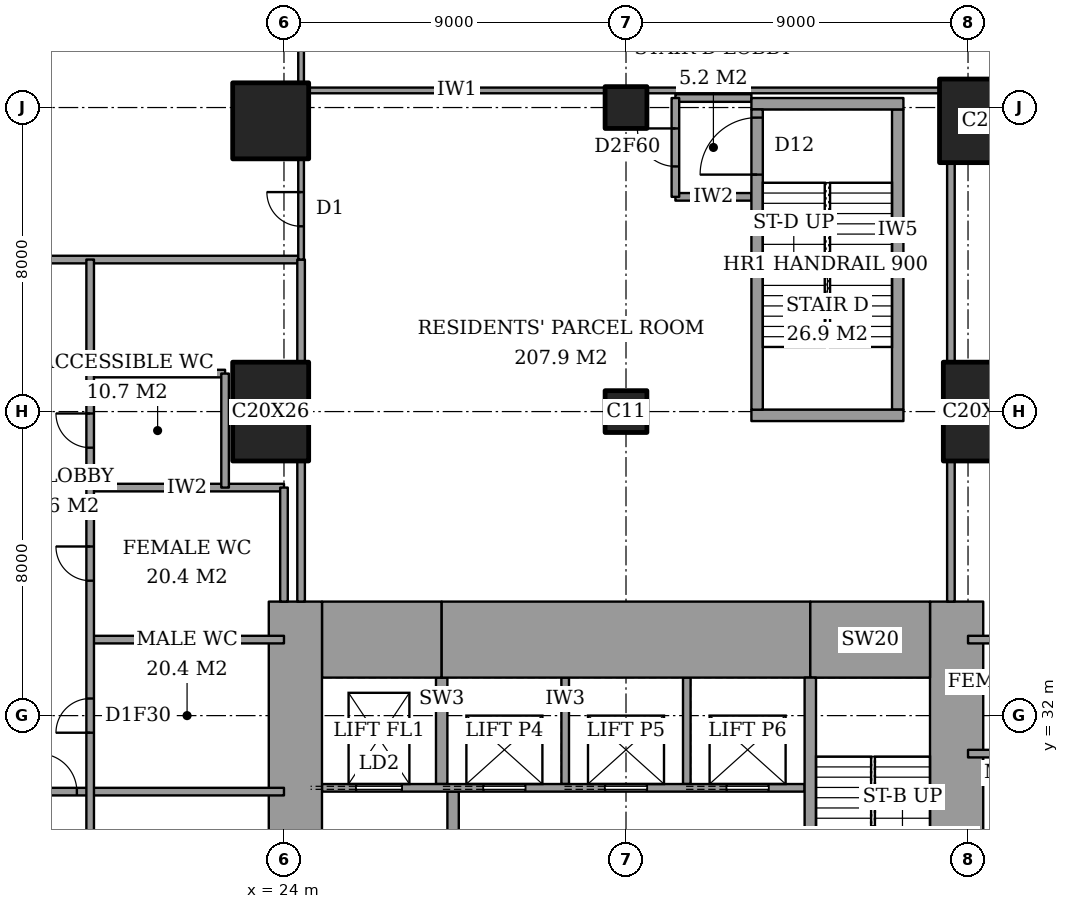
"""IFC4 building model, lengths in metres.
Left out: names, types, materials, properties, quantities, classifications, styles, units other than length and angle.
Written with IfcOpenShell. Run it as: python <this file> out.ifc"""

import sys

from ifc_helpers import new_model, si_unit, direction, frame, frame_2d, origin, origin_2d, place, context, subcontext, project, spatial, rectangle, extrude, element, fill, save


model = new_model("IFC4")
c1 = context("Model", 3, precision=1e-05, world=origin(), true_north=direction((0.0, 1.0)))
c2 = subcontext(c1, "Body", "Model", "MODEL_VIEW")
j1 = project(units=[si_unit("LENGTHUNIT", "METRE"), si_unit("PLANEANGLEUNIT", "RADIAN")], contexts=[c1])
p1 = place(None, origin())
s1 = spatial("IfcSite", under=j1, at=p1, CompositionType="ELEMENT")
p2 = place(p1, origin())
s2 = spatial("IfcBuilding", under=s1, at=p2, CompositionType="ELEMENT")
p3 = place(p2, origin())
s3 = spatial("IfcBuildingStorey", under=s2, at=p3, CompositionType="ELEMENT", Elevation=0.0)
p4 = place(p3, frame((23.65, 40.0, 0.0), z_axis=(0.0, 0.0, 1.0), x_axis=(1.0, 0.0, 0.0)))
e1 = element("IfcColumn", 1, at=p4, inside=s3, PredefinedType="COLUMN", context=c2, shape_type="SweptSolid", body=[
    extrude(rectangle(XDim=2.0, YDim=2.6, at=origin_2d()), origin(), (0.0, 0.0, 1.0), 6.0),
])
p5 = place(p3, frame((23.65, 47.65, 0.0), z_axis=(0.0, 0.0, 1.0), x_axis=(1.0, 0.0, 0.0)))
e2 = element("IfcColumn", 2, at=p5, inside=s3, PredefinedType="COLUMN", context=c2, shape_type="SweptSolid", body=[
    extrude(rectangle(XDim=2.0, YDim=2.0, at=origin_2d()), origin(), (0.0, 0.0, 1.0), 6.0),
])
for number, where, z_axis, x_axis in (
    (3, (33.0, 40.0, 0.0), (0.0, 0.0, 1.0), (1.0, 0.0, 0.0)),
    (4, (33.0, 48.0, 0.0), (0.0, 0.0, 1.0), (1.0, 0.0, 0.0)),
):
    element("IfcColumn", number, at=place(p3, frame(where, z_axis=z_axis, x_axis=x_axis)), inside=s3, PredefinedType="COLUMN", context=c2, shape_type="SweptSolid", body=[
        extrude(rectangle(XDim=1.1, YDim=1.1, at=origin_2d()), origin(), (0.0, 0.0, 1.0), 6.0),
    ])
p6 = place(p3, frame((42.35, 40.0, 0.0), z_axis=(0.0, 0.0, 1.0), x_axis=(1.0, 0.0, 0.0)))
e5 = element("IfcColumn", 5, at=p6, inside=s3, PredefinedType="COLUMN", context=c2, shape_type="SweptSolid", body=[
    extrude(rectangle(XDim=2.0, YDim=2.6, at=origin_2d()), origin(), (0.0, 0.0, 1.0), 6.0),
])
p7 = place(p3, frame((42.35, 47.65, 0.0), z_axis=(0.0, 0.0, 1.0), x_axis=(1.0, 0.0, 0.0)))
e6 = element("IfcColumn", 6, at=p7, inside=s3, PredefinedType="COLUMN", context=c2, shape_type="SweptSolid", body=[
    extrude(rectangle(XDim=2.2, YDim=2.2, at=origin_2d()), origin(), (0.0, 0.0, 1.0), 6.0),
])
p8 = place(p3, frame((25.0, 34.0, 0.0), z_axis=(0.0, 0.0, 1.0), x_axis=(1.0, 0.0, 0.0)))
e7 = element("IfcWall", 7, at=p8, inside=s3, PredefinedType="SHEAR", context=c2, shape_type="SweptSolid", body=[
    extrude(rectangle(XDim=3.15, YDim=2.0, at=frame_2d((1.575, 0.0))), origin(), (0.0, 0.0, 1.0), 6.0),
])
p9 = place(p3, frame((28.15, 34.0, 0.0), z_axis=(0.0, 0.0, 1.0), x_axis=(1.0, 0.0, 0.0)))
e8 = element("IfcWall", 8, at=p9, inside=s3, PredefinedType="SHEAR", context=c2, shape_type="SweptSolid", body=[
    extrude(rectangle(XDim=9.7, YDim=2.0, at=frame_2d((4.85, 0.0))), origin(), (0.0, 0.0, 1.0), 6.0),
])
p10 = place(p3, frame((37.85, 34.0, 0.0), z_axis=(0.0, 0.0, 1.0), x_axis=(1.0, 0.0, 0.0)))
e9 = element("IfcWall", 9, at=p10, inside=s3, PredefinedType="SHEAR", context=c2, shape_type="SweptSolid", body=[
    extrude(rectangle(XDim=3.15, YDim=2.0, at=frame_2d((1.575, 0.0))), origin(), (0.0, 0.0, 1.0), 6.0),
])
p11 = place(p3, frame((24.3, 23.15, 0.0), z_axis=(0.0, 0.0, 1.0), x_axis=(0.0, 1.0, 0.0)))
e10 = element("IfcWall", 10, at=p11, inside=s3, PredefinedType="SHEAR", context=c2, shape_type="SweptSolid", body=[
    extrude(rectangle(XDim=11.85, YDim=1.4, at=frame_2d((5.925, 0.0))), origin(), (0.0, 0.0, 1.0), 6.0),
])
p12 = place(p11, frame((0.75, 0.0, 0.0)))
e11 = element("IfcOpeningElement", 11, at=p12, cuts=e10, PredefinedType="OPENING", context=c2, shape_type="SweptSolid", body=[
    extrude(rectangle(XDim=1.8, YDim=2.4, at=frame_2d((0.9, 1.2))), frame((0.0, 0.71, 0.0), z_axis=(0.0, -1.0, 0.0), x_axis=(1.0, 0.0, 0.0)), (0.0, 0.0, 1.0), 1.42),
])
p13 = place(p3, frame((41.7, 24.85, 0.0), z_axis=(0.0, 0.0, 1.0), x_axis=(0.0, 1.0, 0.0)))
e12 = element("IfcWall", 12, at=p13, inside=s3, PredefinedType="SHEAR", context=c2, shape_type="SweptSolid", body=[
    extrude(rectangle(XDim=10.15, YDim=1.4, at=frame_2d((5.075, 0.0))), origin(), (0.0, 0.0, 1.0), 6.0),
])
p14 = place(p3, frame((37.85, 24.85, 0.0), z_axis=(0.0, 0.0, 1.0), x_axis=(0.0, 1.0, 0.0)))
e13 = element("IfcWall", 13, at=p14, inside=s3, PredefinedType="SHEAR", context=c2, shape_type="SweptSolid", body=[
    extrude(rectangle(XDim=8.15, YDim=0.3, at=frame_2d((4.075, 0.0))), origin(), (0.0, 0.0, 1.0), 6.0),
])
p15 = place(p3, frame((28.45, 23.3, 0.0), z_axis=(0.0, 0.0, 1.0), x_axis=(0.0, 1.0, 0.0)))
e14 = element("IfcWall", 14, at=p15, inside=s3, PredefinedType="PARTITIONING", context=c2, shape_type="SweptSolid", body=[
    extrude(rectangle(XDim=6.7, YDim=0.3, at=frame_2d((3.35, 0.0))), origin(), (0.0, 0.0, 1.0), 6.0),
])
p16 = place(p15, frame((2.7, 0.0, 0.0)))
e15 = element("IfcOpeningElement", 15, at=p16, cuts=e14, PredefinedType="OPENING", context=c2, shape_type="SweptSolid", body=[
    extrude(rectangle(XDim=1.2, YDim=2.1, at=frame_2d((0.6, 1.05))), frame((0.0, 0.16, 0.0), z_axis=(0.0, -1.0, 0.0), x_axis=(1.0, 0.0, 0.0)), (0.0, 0.0, 1.0), 0.32),
])
p17 = place(p3, frame((16.0, 30.0, 0.0), z_axis=(0.0, 0.0, 1.0), x_axis=(1.0, 0.0, 0.0)))
e16 = element("IfcWall", 16, at=p17, inside=s3, PredefinedType="PARTITIONING", context=c2, shape_type="SweptSolid", body=[
    extrude(rectangle(XDim=8.0, YDim=0.2, at=frame_2d((4.0, 0.0))), origin(), (0.0, 0.0, 1.0), 5.7),
])
p18 = place(p17, frame((1.55, 0.0, 0.0)))
e17 = element("IfcOpeningElement", 17, at=p18, cuts=e16, PredefinedType="OPENING", context=c2, shape_type="SweptSolid", body=[
    extrude(rectangle(XDim=1.0, YDim=2.1, at=frame_2d((0.5, 1.05))), frame((0.0, 0.11, 0.0), z_axis=(0.0, -1.0, 0.0), x_axis=(1.0, 0.0, 0.0)), (0.0, 0.0, 1.0), 0.22),
])
for number, where, z_axis, x_axis in (
    (18, (42.0, 31.0, 0.0), (0.0, 0.0, 1.0), (1.0, 0.0, 0.0)),
    (19, (18.9, 34.0, 0.0), (0.0, 0.0, 1.0), (1.0, 0.0, 0.0)),
    (20, (42.0, 34.0, 0.0), (0.0, 0.0, 1.0), (1.0, 0.0, 0.0)),
    (21, (18.9, 38.0, 0.0), (0.0, 0.0, 1.0), (1.0, 0.0, 0.0)),
):
    element("IfcWall", number, at=place(p3, frame(where, z_axis=z_axis, x_axis=x_axis)), inside=s3, PredefinedType="PARTITIONING", context=c2, shape_type="SweptSolid", body=[
        extrude(rectangle(XDim=5.1, YDim=0.2, at=frame_2d((2.55, 0.0))), origin(), (0.0, 0.0, 1.0), 5.7),
    ])
p19 = place(p3, frame((18.9, 41.0, 0.0), z_axis=(0.0, 0.0, 1.0), x_axis=(1.0, 0.0, 0.0)))
e22 = element("IfcWall", 22, at=p19, inside=s3, PredefinedType="PARTITIONING", context=c2, shape_type="SweptSolid", body=[
    extrude(rectangle(XDim=3.55, YDim=0.2, at=frame_2d((1.775, 0.0))), origin(), (0.0, 0.0, 1.0), 5.7),
])
p20 = place(p3, frame((16.0, 44.0, 0.0), z_axis=(0.0, 0.0, 1.0), x_axis=(1.0, 0.0, 0.0)))
e23 = element("IfcWall", 23, at=p20, inside=s3, PredefinedType="PARTITIONING", context=c2, shape_type="SweptSolid", body=[
    extrude(rectangle(XDim=8.45, YDim=0.2, at=frame_2d((4.225, 0.0))), origin(), (0.0, 0.0, 1.0), 5.7),
])
for number, where, z_axis, x_axis in (
    (24, (34.3, 45.65, 0.0), (0.0, 0.0, 1.0), (1.0, 0.0, 0.0)),
    (25, (34.3, 48.25, 0.0), (0.0, 0.0, 1.0), (1.0, 0.0, 0.0)),
):
    element("IfcWall", number, at=place(p3, frame(where, z_axis=z_axis, x_axis=x_axis)), inside=s3, PredefinedType="PARTITIONING", context=c2, shape_type="SweptSolid", body=[
        extrude(rectangle(XDim=2.0, YDim=0.2, at=frame_2d((1.0, 0.0))), origin(), (0.0, 0.0, 1.0), 5.7),
    ])
p21 = place(p3, frame((24.65, 48.45, 0.0), z_axis=(0.0, 0.0, 1.0), x_axis=(1.0, 0.0, 0.0)))
e26 = element("IfcWall", 26, at=p21, inside=s3, PredefinedType="PARTITIONING", context=c2, shape_type="SweptSolid", body=[
    extrude(rectangle(XDim=7.8, YDim=0.15, at=frame_2d((3.9, 0.0))), origin(), (0.0, 0.0, 1.0), 5.7),
])
p22 = place(p3, frame((33.55, 48.45, 0.0), z_axis=(0.0, 0.0, 1.0), x_axis=(1.0, 0.0, 0.0)))
e27 = element("IfcWall", 27, at=p22, inside=s3, PredefinedType="PARTITIONING", context=c2, shape_type="SweptSolid", body=[
    extrude(rectangle(XDim=7.7, YDim=0.15, at=frame_2d((3.85, 0.0))), origin(), (0.0, 0.0, 1.0), 5.7),
])
p23 = place(p3, frame((18.9, 28.0, 0.0), z_axis=(0.0, 0.0, 1.0), x_axis=(0.0, 1.0, 0.0)))
e28 = element("IfcWall", 28, at=p23, inside=s3, PredefinedType="PARTITIONING", context=c2, shape_type="SweptSolid", body=[
    extrude(rectangle(XDim=16.0, YDim=0.2, at=frame_2d((8.0, 0.0))), origin(), (0.0, 0.0, 1.0), 5.7),
])
p24 = place(p23, frame((3.55, 0.0, 0.0)))
e29 = element("IfcOpeningElement", 29, at=p24, cuts=e28, PredefinedType="OPENING", context=c2, shape_type="SweptSolid", body=[
    extrude(rectangle(XDim=0.9, YDim=2.1, at=frame_2d((0.45, 1.05))), frame((0.0, 0.11, 0.0), z_axis=(0.0, -1.0, 0.0), x_axis=(1.0, 0.0, 0.0)), (0.0, 0.0, 1.0), 0.22),
])
p25 = place(p23, frame((7.55, 0.0, 0.0)))
e30 = element("IfcOpeningElement", 30, at=p25, cuts=e28, PredefinedType="OPENING", context=c2, shape_type="SweptSolid", body=[
    extrude(rectangle(XDim=0.9, YDim=2.1, at=frame_2d((0.45, 1.05))), frame((0.0, 0.11, 0.0), z_axis=(0.0, -1.0, 0.0), x_axis=(1.0, 0.0, 0.0)), (0.0, 0.0, 1.0), 0.22),
])
p26 = place(p23, frame((11.05, 0.0, 0.0)))
e31 = element("IfcOpeningElement", 31, at=p26, cuts=e28, PredefinedType="OPENING", context=c2, shape_type="SweptSolid", body=[
    extrude(rectangle(XDim=0.9, YDim=2.1, at=frame_2d((0.45, 1.05))), frame((0.0, 0.11, 0.0), z_axis=(0.0, -1.0, 0.0), x_axis=(1.0, 0.0, 0.0)), (0.0, 0.0, 1.0), 0.22),
])
for number, where, z_axis, x_axis in (
    (32, (22.45, 38.0, 0.0), (0.0, 0.0, 1.0), (0.0, 1.0, 0.0)),
    (33, (24.0, 35.0, 0.0), (0.0, 0.0, 1.0), (0.0, 1.0, 0.0)),
):
    element("IfcWall", number, at=place(p3, frame(where, z_axis=z_axis, x_axis=x_axis)), inside=s3, PredefinedType="PARTITIONING", context=c2, shape_type="SweptSolid", body=[
        extrude(rectangle(XDim=3.0, YDim=0.2, at=frame_2d((1.5, 0.0))), origin(), (0.0, 0.0, 1.0), 5.7),
    ])
p27 = place(p3, frame((24.45, 35.0, 0.0), z_axis=(0.0, 0.0, 1.0), x_axis=(0.0, 1.0, 0.0)))
e34 = element("IfcWall", 34, at=p27, inside=s3, PredefinedType="PARTITIONING", context=c2, shape_type="SweptSolid", body=[
    extrude(rectangle(XDim=3.7, YDim=0.2, at=frame_2d((1.85, 0.0))), origin(), (0.0, 0.0, 1.0), 5.7),
])
p28 = place(p3, frame((24.45, 41.3, 0.0), z_axis=(0.0, 0.0, 1.0), x_axis=(0.0, 1.0, 0.0)))
e35 = element("IfcWall", 35, at=p28, inside=s3, PredefinedType="PARTITIONING", context=c2, shape_type="SweptSolid", body=[
    extrude(rectangle(XDim=2.7, YDim=0.2, at=frame_2d((1.35, 0.0))), origin(), (0.0, 0.0, 1.0), 5.7),
])
p29 = place(p3, frame((24.45, 44.0, 0.0), z_axis=(0.0, 0.0, 1.0), x_axis=(0.0, 1.0, 0.0)))
e36 = element("IfcWall", 36, at=p29, inside=s3, PredefinedType="PARTITIONING", context=c2, shape_type="SweptSolid", body=[
    extrude(rectangle(XDim=2.65, YDim=0.15, at=frame_2d((1.325, 0.0))), origin(), (0.0, 0.0, 1.0), 5.7),
])
p30 = place(p29, frame((0.875, 0.0, 0.0)))
e37 = element("IfcOpeningElement", 37, at=p30, cuts=e36, PredefinedType="OPENING", context=c2, shape_type="SweptSolid", body=[
    extrude(rectangle(XDim=0.9, YDim=2.1, at=frame_2d((0.45, 1.05))), frame((0.0, 0.085, 0.0), z_axis=(0.0, -1.0, 0.0), x_axis=(1.0, 0.0, 0.0)), (0.0, 0.0, 1.0), 0.17),
])
p31 = place(p3, frame((24.45, 48.65, 0.0), z_axis=(0.0, 0.0, 1.0), x_axis=(0.0, 1.0, 0.0)))
e38 = element("IfcWall", 38, at=p31, inside=s3, PredefinedType="PARTITIONING", context=c2, shape_type="SweptSolid", body=[
    extrude(rectangle(XDim=6.8, YDim=0.15, at=frame_2d((3.4, 0.0))), origin(), (0.0, 0.0, 1.0), 5.7),
])
p32 = place(p31, frame((2.95, 0.0, 0.0)))
e39 = element("IfcOpeningElement", 39, at=p32, cuts=e38, PredefinedType="OPENING", context=c2, shape_type="SweptSolid", body=[
    extrude(rectangle(XDim=0.9, YDim=2.1, at=frame_2d((0.45, 1.05))), frame((0.0, 0.085, 0.0), z_axis=(0.0, -1.0, 0.0), x_axis=(1.0, 0.0, 0.0)), (0.0, 0.0, 1.0), 0.17),
])
p33 = place(p3, frame((34.3, 45.65, 0.0), z_axis=(0.0, 0.0, 1.0), x_axis=(0.0, 1.0, 0.0)))
e40 = element("IfcWall", 40, at=p33, inside=s3, PredefinedType="PARTITIONING", context=c2, shape_type="SweptSolid", body=[
    extrude(rectangle(XDim=2.6, YDim=0.2, at=frame_2d((1.3, 0.0))), origin(), (0.0, 0.0, 1.0), 5.7),
])
p34 = place(p33, frame((0.8, 0.0, 0.0)))
e41 = element("IfcOpeningElement", 41, at=p34, cuts=e40, PredefinedType="OPENING", context=c2, shape_type="SweptSolid", body=[
    extrude(rectangle(XDim=1.0, YDim=2.1, at=frame_2d((0.5, 1.05))), frame((0.0, 0.11, 0.0), z_axis=(0.0, -1.0, 0.0), x_axis=(1.0, 0.0, 0.0)), (0.0, 0.0, 1.0), 0.22),
])
p35 = place(p3, frame((41.55, 35.0, 0.0), z_axis=(0.0, 0.0, 1.0), x_axis=(0.0, 1.0, 0.0)))
e42 = element("IfcWall", 42, at=p35, inside=s3, PredefinedType="PARTITIONING", context=c2, shape_type="SweptSolid", body=[
    extrude(rectangle(XDim=3.7, YDim=0.2, at=frame_2d((1.85, 0.0))), origin(), (0.0, 0.0, 1.0), 5.7),
])
p36 = place(p3, frame((41.55, 41.3, 0.0), z_axis=(0.0, 0.0, 1.0), x_axis=(0.0, 1.0, 0.0)))
e43 = element("IfcWall", 43, at=p36, inside=s3, PredefinedType="PARTITIONING", context=c2, shape_type="SweptSolid", body=[
    extrude(rectangle(XDim=5.25, YDim=0.2, at=frame_2d((2.625, 0.0))), origin(), (0.0, 0.0, 1.0), 5.7),
])
p37 = place(p3, frame((25.0, 30.1, 0.0), z_axis=(0.0, 0.0, 1.0), x_axis=(1.0, 0.0, 0.0)))
e44 = element("IfcWall", 44, at=p37, inside=s3, PredefinedType="PARTITIONING", context=c2, shape_type="SweptSolid", body=[
    extrude(rectangle(XDim=12.7, YDim=0.2, at=frame_2d((6.35, 0.0))), origin(), (0.0, 0.0, 1.0), 6.0),
])
p38 = place(p37, frame((4.25, 0.0, 0.0)))
e45 = element("IfcOpeningElement", 45, at=p38, cuts=e44, PredefinedType="OPENING", context=c2, shape_type="SweptSolid", body=[
    extrude(rectangle(XDim=1.1, YDim=2.1, at=frame_2d((0.55, 1.05))), frame((0.0, 0.11, 0.0), z_axis=(0.0, -1.0, 0.0), x_axis=(1.0, 0.0, 0.0)), (0.0, 0.0, 1.0), 0.22),
])
p39 = place(p37, frame((7.45, 0.0, 0.0)))
e46 = element("IfcOpeningElement", 46, at=p39, cuts=e44, PredefinedType="OPENING", context=c2, shape_type="SweptSolid", body=[
    extrude(rectangle(XDim=1.1, YDim=2.1, at=frame_2d((0.55, 1.05))), frame((0.0, 0.11, 0.0), z_axis=(0.0, -1.0, 0.0), x_axis=(1.0, 0.0, 0.0)), (0.0, 0.0, 1.0), 0.22),
])
p40 = place(p37, frame((10.65, 0.0, 0.0)))
e47 = element("IfcOpeningElement", 47, at=p40, cuts=e44, PredefinedType="OPENING", context=c2, shape_type="SweptSolid", body=[
    extrude(rectangle(XDim=1.1, YDim=2.1, at=frame_2d((0.55, 1.05))), frame((0.0, 0.11, 0.0), z_axis=(0.0, -1.0, 0.0), x_axis=(1.0, 0.0, 0.0)), (0.0, 0.0, 1.0), 0.22),
])
p41 = place(p37, frame((0.9, 0.0, 0.0)))
e48 = element("IfcOpeningElement", 48, at=p41, cuts=e44, PredefinedType="OPENING", context=c2, shape_type="SweptSolid", body=[
    extrude(rectangle(XDim=1.2, YDim=2.1, at=frame_2d((0.6, 1.05))), frame((0.0, 0.11, 0.0), z_axis=(0.0, -1.0, 0.0), x_axis=(1.0, 0.0, 0.0)), (0.0, 0.0, 1.0), 0.22),
])
for number, where, z_axis, x_axis in (
    (49, (31.4, 30.2, 0.0), (0.0, 0.0, 1.0), (0.0, 1.0, 0.0)),
    (50, (34.6, 30.2, 0.0), (0.0, 0.0, 1.0), (0.0, 1.0, 0.0)),
):
    element("IfcWall", number, at=place(p3, frame(where, z_axis=z_axis, x_axis=x_axis)), inside=s3, PredefinedType="PARTITIONING", context=c2, shape_type="SweptSolid", body=[
        extrude(rectangle(XDim=2.8, YDim=0.2, at=frame_2d((1.4, 0.0))), origin(), (0.0, 0.0, 1.0), 6.0),
    ])
p42 = place(p3, frame((28.15, 30.2, 0.0), z_axis=(0.0, 0.0, 1.0), x_axis=(0.0, 1.0, 0.0)))
e51 = element("IfcWall", 51, at=p42, inside=s3, PredefinedType="SHEAR", context=c2, shape_type="SweptSolid", body=[
    extrude(rectangle(XDim=2.8, YDim=0.3, at=frame_2d((1.4, 0.0))), origin(), (0.0, 0.0, 1.0), 6.0),
])
for number, where, z_axis, x_axis in (
    (52, (36.3, 39.9, 0.0), (0.0, 0.0, 1.0), (1.0, 0.0, 0.0)),
    (53, (36.3, 48.1, 0.0), (0.0, 0.0, 1.0), (1.0, 0.0, 0.0)),
):
    element("IfcWall", number, at=place(p3, frame(where, z_axis=z_axis, x_axis=x_axis)), inside=s3, PredefinedType="PARTITIONING", context=c2, shape_type="SweptSolid", body=[
        extrude(rectangle(XDim=4.0, YDim=0.3, at=frame_2d((2.0, 0.0))), origin(), (0.0, 0.0, 1.0), 6.0),
    ])
p43 = place(p3, frame((36.45, 40.05, 0.0), z_axis=(0.0, 0.0, 1.0), x_axis=(0.0, 1.0, 0.0)))
e54 = element("IfcWall", 54, at=p43, inside=s3, PredefinedType="PARTITIONING", context=c2, shape_type="SweptSolid", body=[
    extrude(rectangle(XDim=7.9, YDim=0.3, at=frame_2d((3.95, 0.0))), origin(), (0.0, 0.0, 1.0), 6.0),
])
p44 = place(p43, frame((6.185, 0.0, 0.0)))
e55 = element("IfcOpeningElement", 55, at=p44, cuts=e54, PredefinedType="OPENING", context=c2, shape_type="SweptSolid", body=[
    extrude(rectangle(XDim=1.5, YDim=2.1, at=frame_2d((0.75, 1.05))), frame((0.0, 0.16, 0.0), z_axis=(0.0, -1.0, 0.0), x_axis=(1.0, 0.0, 0.0)), (0.0, 0.0, 1.0), 0.32),
])
p45 = place(p3, frame((40.15, 40.05, 0.0), z_axis=(0.0, 0.0, 1.0), x_axis=(0.0, 1.0, 0.0)))
e56 = element("IfcWall", 56, at=p45, inside=s3, PredefinedType="PARTITIONING", context=c2, shape_type="SweptSolid", body=[
    extrude(rectangle(XDim=7.9, YDim=0.3, at=frame_2d((3.95, 0.0))), origin(), (0.0, 0.0, 1.0), 6.0),
])
p46 = place(p24, origin())
e57 = element("IfcDoor", 57, at=p46, inside=s3, OperationType="SINGLE_SWING_RIGHT", PredefinedType="DOOR", context=c2, shape_type="SweptSolid", body=[
    extrude(rectangle(XDim=0.9, YDim=2.1, at=frame_2d((0.45, 1.05))), frame((0.0, 0.025, 0.0), z_axis=(0.0, -1.0, 0.0), x_axis=(1.0, 0.0, 0.0)), (0.0, 0.0, 1.0), 0.05),
])
fill(e29, e57)
p47 = place(p25, origin())
e58 = element("IfcDoor", 58, at=p47, inside=s3, OperationType="SINGLE_SWING_LEFT", PredefinedType="DOOR", context=c2, shape_type="SweptSolid", body=[
    extrude(rectangle(XDim=0.9, YDim=2.1, at=frame_2d((0.45, 1.05))), frame((0.0, 0.025, 0.0), z_axis=(0.0, -1.0, 0.0), x_axis=(1.0, 0.0, 0.0)), (0.0, 0.0, 1.0), 0.05),
])
fill(e30, e58)
p48 = place(p26, origin())
e59 = element("IfcDoor", 59, at=p48, inside=s3, OperationType="SINGLE_SWING_LEFT", PredefinedType="DOOR", context=c2, shape_type="SweptSolid", body=[
    extrude(rectangle(XDim=0.9, YDim=2.1, at=frame_2d((0.45, 1.05))), frame((0.0, 0.025, 0.0), z_axis=(0.0, -1.0, 0.0), x_axis=(1.0, 0.0, 0.0)), (0.0, 0.0, 1.0), 0.05),
])
fill(e31, e59)
p49 = place(p30, origin())
e60 = element("IfcDoor", 60, at=p49, inside=s3, OperationType="SINGLE_SWING_LEFT", PredefinedType="DOOR", context=c2, shape_type="SweptSolid", body=[
    extrude(rectangle(XDim=0.9, YDim=2.1, at=frame_2d((0.45, 1.05))), frame((0.0, 0.025, 0.0), z_axis=(0.0, -1.0, 0.0), x_axis=(1.0, 0.0, 0.0)), (0.0, 0.0, 1.0), 0.05),
])
fill(e37, e60)
p50 = place(p18, origin())
e61 = element("IfcDoor", 61, at=p50, inside=s3, OperationType="SINGLE_SWING_RIGHT", PredefinedType="DOOR", context=c2, shape_type="SweptSolid", body=[
    extrude(rectangle(XDim=1.0, YDim=2.1, at=frame_2d((0.5, 1.05))), frame((0.0, 0.025, 0.0), z_axis=(0.0, -1.0, 0.0), x_axis=(1.0, 0.0, 0.0)), (0.0, 0.0, 1.0), 0.05),
])
fill(e17, e61)
p51 = place(p34, origin())
e62 = element("IfcDoor", 62, at=p51, inside=s3, OperationType="SINGLE_SWING_LEFT", PredefinedType="DOOR", context=c2, shape_type="SweptSolid", body=[
    extrude(rectangle(XDim=1.0, YDim=2.1, at=frame_2d((0.5, 1.05))), frame((0.0, 0.025, 0.0), z_axis=(0.0, -1.0, 0.0), x_axis=(1.0, 0.0, 0.0)), (0.0, 0.0, 1.0), 0.05),
])
fill(e41, e62)
p52 = place(p38, origin())
e63 = element("IfcDoor", 63, at=p52, inside=s3, OperationType="SLIDING_TO_LEFT", PredefinedType="DOOR", context=c2, shape_type="SweptSolid", body=[
    extrude(rectangle(XDim=1.1, YDim=2.1, at=frame_2d((0.55, 1.05))), frame((0.0, 0.025, 0.0), z_axis=(0.0, -1.0, 0.0), x_axis=(1.0, 0.0, 0.0)), (0.0, 0.0, 1.0), 0.05),
])
fill(e45, e63)
p53 = place(p39, origin())
e64 = element("IfcDoor", 64, at=p53, inside=s3, OperationType="SLIDING_TO_LEFT", PredefinedType="DOOR", context=c2, shape_type="SweptSolid", body=[
    extrude(rectangle(XDim=1.1, YDim=2.1, at=frame_2d((0.55, 1.05))), frame((0.0, 0.025, 0.0), z_axis=(0.0, -1.0, 0.0), x_axis=(1.0, 0.0, 0.0)), (0.0, 0.0, 1.0), 0.05),
])
fill(e46, e64)
p54 = place(p40, origin())
e65 = element("IfcDoor", 65, at=p54, inside=s3, OperationType="SLIDING_TO_LEFT", PredefinedType="DOOR", context=c2, shape_type="SweptSolid", body=[
    extrude(rectangle(XDim=1.1, YDim=2.1, at=frame_2d((0.55, 1.05))), frame((0.0, 0.025, 0.0), z_axis=(0.0, -1.0, 0.0), x_axis=(1.0, 0.0, 0.0)), (0.0, 0.0, 1.0), 0.05),
])
fill(e47, e65)
p55 = place(p41, origin())
e66 = element("IfcDoor", 66, at=p55, inside=s3, OperationType="SLIDING_TO_LEFT", PredefinedType="DOOR", context=c2, shape_type="SweptSolid", body=[
    extrude(rectangle(XDim=1.2, YDim=2.1, at=frame_2d((0.6, 1.05))), frame((0.0, 0.025, 0.0), z_axis=(0.0, -1.0, 0.0), x_axis=(1.0, 0.0, 0.0)), (0.0, 0.0, 1.0), 0.05),
])
fill(e48, e66)
p56 = place(p44, origin())
e67 = element("IfcDoor", 67, at=p56, inside=s3, OperationType="DOUBLE_DOOR_SINGLE_SWING", PredefinedType="DOOR", context=c2, shape_type="SweptSolid", body=[
    extrude(rectangle(XDim=1.5, YDim=2.1, at=frame_2d((0.75, 1.05))), frame((0.0, 0.025, 0.0), z_axis=(0.0, -1.0, 0.0), x_axis=(1.0, 0.0, 0.0)), (0.0, 0.0, 1.0), 0.05),
])
fill(e55, e67)
save(model, sys.argv[1])
